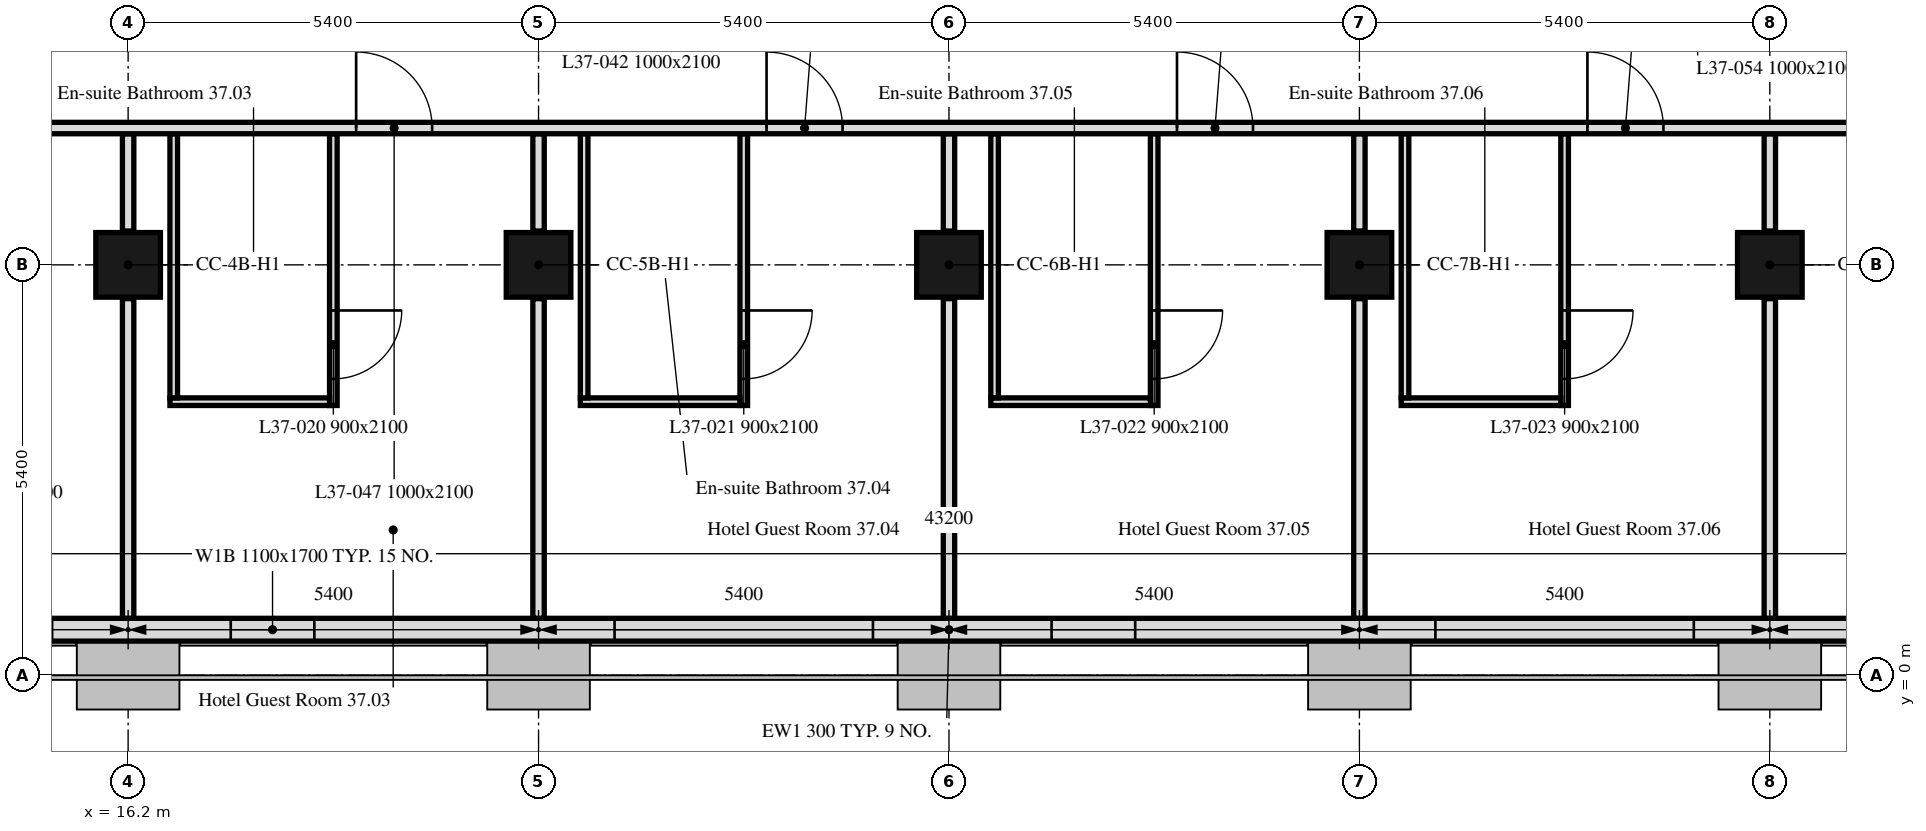
"""IFC4 building model, lengths in metres.
Left out: names, types, materials, properties, quantities, classifications, styles, units other than length and angle.
Written with IfcOpenShell. Run it as: python <this file> out.ifc"""

import sys

from ifc_helpers import new_model, si_unit, direction, frame, frame_2d, origin, origin_2d, place, context, subcontext, project, spatial, rectangle, extrude, element, fill, save


model = new_model("IFC4")
c1 = context("Model", 3, precision=1e-05, world=origin(), true_north=direction((0.0, 1.0)))
c2 = subcontext(c1, "Body", "Model", "MODEL_VIEW")
j1 = project(units=[si_unit("LENGTHUNIT", "METRE"), si_unit("PLANEANGLEUNIT", "RADIAN")], contexts=[c1])
p1 = place(None, origin())
s1 = spatial("IfcSite", under=j1, at=p1, CompositionType="ELEMENT")
p2 = place(p1, origin())
s2 = spatial("IfcBuilding", under=s1, at=p2, CompositionType="ELEMENT")
p3 = place(p2, frame((0.0, 0.0, 159.4)))
s3 = spatial("IfcBuildingStorey", under=s2, at=p3, CompositionType="ELEMENT", Elevation=159.4)
for number, where, z_axis, x_axis in (
    (1, (16.2, 5.4, 0.0), (0.0, 0.0, 1.0), (1.0, 0.0, 0.0)),
    (2, (21.6, 5.4, 0.0), (0.0, 0.0, 1.0), (1.0, 0.0, 0.0)),
    (3, (27.0, 5.4, 0.0), (0.0, 0.0, 1.0), (1.0, 0.0, 0.0)),
    (4, (32.4, 5.4, 0.0), (0.0, 0.0, 1.0), (1.0, 0.0, 0.0)),
    (5, (37.8, 5.4, 0.0), (0.0, 0.0, 1.0), (1.0, 0.0, 0.0)),
):
    element("IfcColumn", number, at=place(p3, frame(where, z_axis=z_axis, x_axis=x_axis)), inside=s3, PredefinedType="COLUMN", context=c2, shape_type="SweptSolid", body=[
        extrude(rectangle(XDim=0.85, YDim=0.85, at=origin_2d()), origin(), (0.0, 0.0, 1.0), 3.0),
    ])
p4 = place(p3, frame((10.986, 0.6, 0.0), z_axis=(0.0, 0.0, 1.0), x_axis=(1.0, 0.0, 0.0)))
e6 = element("IfcWall", 6, at=p4, inside=s3, PredefinedType="SOLIDWALL", context=c2, shape_type="SweptSolid", body=[
    extrude(rectangle(XDim=32.027, YDim=0.3, at=frame_2d((16.014, 0.0))), origin(), (0.0, 0.0, 1.0), 3.0),
])
p5 = place(p4, frame((0.814, 0.0, 0.9)))
e7 = element("IfcOpeningElement", 7, at=p5, cuts=e6, PredefinedType="OPENING", context=c2, shape_type="SweptSolid", body=[
    extrude(rectangle(XDim=3.4, YDim=1.7, at=frame_2d((1.7, 0.85))), frame((0.0, 0.16, 0.0), z_axis=(0.0, -1.0, 0.0), x_axis=(1.0, 0.0, 0.0)), (0.0, 0.0, 1.0), 0.32),
])
p6 = place(p4, frame((6.564, 0.0, 0.9)))
e8 = element("IfcOpeningElement", 8, at=p6, cuts=e6, PredefinedType="OPENING", context=c2, shape_type="SweptSolid", body=[
    extrude(rectangle(XDim=1.1, YDim=1.7, at=frame_2d((0.55, 0.85))), frame((0.0, 0.16, 0.0), z_axis=(0.0, -1.0, 0.0), x_axis=(1.0, 0.0, 0.0)), (0.0, 0.0, 1.0), 0.32),
])
p7 = place(p4, frame((11.614, 0.0, 0.9)))
e9 = element("IfcOpeningElement", 9, at=p7, cuts=e6, PredefinedType="OPENING", context=c2, shape_type="SweptSolid", body=[
    extrude(rectangle(XDim=3.4, YDim=1.7, at=frame_2d((1.7, 0.85))), frame((0.0, 0.16, 0.0), z_axis=(0.0, -1.0, 0.0), x_axis=(1.0, 0.0, 0.0)), (0.0, 0.0, 1.0), 0.32),
])
p8 = place(p4, frame((17.364, 0.0, 0.9)))
e10 = element("IfcOpeningElement", 10, at=p8, cuts=e6, PredefinedType="OPENING", context=c2, shape_type="SweptSolid", body=[
    extrude(rectangle(XDim=1.1, YDim=1.7, at=frame_2d((0.55, 0.85))), frame((0.0, 0.16, 0.0), z_axis=(0.0, -1.0, 0.0), x_axis=(1.0, 0.0, 0.0)), (0.0, 0.0, 1.0), 0.32),
])
p9 = place(p4, frame((22.414, 0.0, 0.9)))
e11 = element("IfcOpeningElement", 11, at=p9, cuts=e6, PredefinedType="OPENING", context=c2, shape_type="SweptSolid", body=[
    extrude(rectangle(XDim=3.4, YDim=1.7, at=frame_2d((1.7, 0.85))), frame((0.0, 0.16, 0.0), z_axis=(0.0, -1.0, 0.0), x_axis=(1.0, 0.0, 0.0)), (0.0, 0.0, 1.0), 0.32),
])
p10 = place(p4, frame((28.164, 0.0, 0.9)))
e12 = element("IfcOpeningElement", 12, at=p10, cuts=e6, PredefinedType="OPENING", context=c2, shape_type="SweptSolid", body=[
    extrude(rectangle(XDim=1.1, YDim=1.7, at=frame_2d((0.55, 0.85))), frame((0.0, 0.16, 0.0), z_axis=(0.0, -1.0, 0.0), x_axis=(1.0, 0.0, 0.0)), (0.0, 0.0, 1.0), 0.32),
])
p11 = place(p3, frame((16.2, 0.751, 0.0), z_axis=(0.0, 0.0, 1.0), x_axis=(0.0, 1.0, 0.0)))
e13 = element("IfcWall", 13, at=p11, inside=s3, PredefinedType="PARTITIONING", context=c2, shape_type="SweptSolid", body=[
    extrude(rectangle(XDim=4.204, YDim=0.15, at=frame_2d((2.102, 0.0))), origin(), (0.0, 0.0, 1.0), 2.4),
])
p12 = place(p3, frame((16.2, 5.845, 0.0), z_axis=(0.0, 0.0, 1.0), x_axis=(0.0, 1.0, 0.0)))
e14 = element("IfcWall", 14, at=p12, inside=s3, PredefinedType="PARTITIONING", context=c2, shape_type="SweptSolid", body=[
    extrude(rectangle(XDim=1.28, YDim=0.15, at=frame_2d((0.64, 0.0))), origin(), (0.0, 0.0, 1.0), 2.4),
])
p13 = place(p3, frame((21.6, 0.751, 0.0), z_axis=(0.0, 0.0, 1.0), x_axis=(0.0, 1.0, 0.0)))
e15 = element("IfcWall", 15, at=p13, inside=s3, PredefinedType="PARTITIONING", context=c2, shape_type="SweptSolid", body=[
    extrude(rectangle(XDim=4.204, YDim=0.15, at=frame_2d((2.102, 0.0))), origin(), (0.0, 0.0, 1.0), 2.4),
])
p14 = place(p3, frame((21.6, 5.845, 0.0), z_axis=(0.0, 0.0, 1.0), x_axis=(0.0, 1.0, 0.0)))
e16 = element("IfcWall", 16, at=p14, inside=s3, PredefinedType="PARTITIONING", context=c2, shape_type="SweptSolid", body=[
    extrude(rectangle(XDim=1.28, YDim=0.15, at=frame_2d((0.64, 0.0))), origin(), (0.0, 0.0, 1.0), 2.4),
])
p15 = place(p3, frame((18.9, 7.125, 0.0), z_axis=(0.0, 0.0, 1.0), x_axis=(0.0, -1.0, 0.0)))
e17 = element("IfcWall", 17, at=p15, inside=s3, PredefinedType="PARTITIONING", context=c2, shape_type="SweptSolid", body=[
    extrude(rectangle(XDim=3.575, YDim=0.1, at=frame_2d((1.788, 0.0))), origin(), (0.0, 0.0, 1.0), 3.0),
])
p16 = place(p15, frame((2.325, 0.0, 0.0)))
e18 = element("IfcOpeningElement", 18, at=p16, cuts=e17, PredefinedType="OPENING", context=c2, shape_type="SweptSolid", body=[
    extrude(rectangle(XDim=0.9, YDim=2.1, at=frame_2d((0.45, 1.05))), frame((0.0, 0.05, 0.0), z_axis=(0.0, -1.0, 0.0), x_axis=(1.0, 0.0, 0.0)), (0.0, 0.0, 1.0), 0.1),
])
p17 = place(p3, frame((18.85, 3.6, 0.0), z_axis=(0.0, 0.0, 1.0), x_axis=(-1.0, 0.0, 0.0)))
e19 = element("IfcWall", 19, at=p17, inside=s3, PredefinedType="PARTITIONING", context=c2, shape_type="SweptSolid", body=[
    extrude(rectangle(XDim=2.1, YDim=0.1, at=frame_2d((1.05, 0.0))), origin(), (0.0, 0.0, 1.0), 3.0),
])
p18 = place(p3, frame((16.8, 3.65, 0.0), z_axis=(0.0, 0.0, 1.0), x_axis=(0.0, 1.0, 0.0)))
e20 = element("IfcWall", 20, at=p18, inside=s3, PredefinedType="PARTITIONING", context=c2, shape_type="SweptSolid", body=[
    extrude(rectangle(XDim=3.475, YDim=0.1, at=frame_2d((1.738, 0.0))), origin(), (0.0, 0.0, 1.0), 3.0),
])
p19 = place(p3, frame((27.0, 0.751, 0.0), z_axis=(0.0, 0.0, 1.0), x_axis=(0.0, 1.0, 0.0)))
e21 = element("IfcWall", 21, at=p19, inside=s3, PredefinedType="PARTITIONING", context=c2, shape_type="SweptSolid", body=[
    extrude(rectangle(XDim=4.204, YDim=0.15, at=frame_2d((2.102, 0.0))), origin(), (0.0, 0.0, 1.0), 2.4),
])
p20 = place(p3, frame((27.0, 5.845, 0.0), z_axis=(0.0, 0.0, 1.0), x_axis=(0.0, 1.0, 0.0)))
e22 = element("IfcWall", 22, at=p20, inside=s3, PredefinedType="PARTITIONING", context=c2, shape_type="SweptSolid", body=[
    extrude(rectangle(XDim=1.28, YDim=0.15, at=frame_2d((0.64, 0.0))), origin(), (0.0, 0.0, 1.0), 2.4),
])
p21 = place(p3, frame((24.3, 7.125, 0.0), z_axis=(0.0, 0.0, 1.0), x_axis=(0.0, -1.0, 0.0)))
e23 = element("IfcWall", 23, at=p21, inside=s3, PredefinedType="PARTITIONING", context=c2, shape_type="SweptSolid", body=[
    extrude(rectangle(XDim=3.575, YDim=0.1, at=frame_2d((1.788, 0.0))), origin(), (0.0, 0.0, 1.0), 3.0),
])
p22 = place(p21, frame((2.325, 0.0, 0.0)))
e24 = element("IfcOpeningElement", 24, at=p22, cuts=e23, PredefinedType="OPENING", context=c2, shape_type="SweptSolid", body=[
    extrude(rectangle(XDim=0.9, YDim=2.1, at=frame_2d((0.45, 1.05))), frame((0.0, 0.05, 0.0), z_axis=(0.0, -1.0, 0.0), x_axis=(1.0, 0.0, 0.0)), (0.0, 0.0, 1.0), 0.1),
])
p23 = place(p3, frame((24.25, 3.6, 0.0), z_axis=(0.0, 0.0, 1.0), x_axis=(-1.0, 0.0, 0.0)))
e25 = element("IfcWall", 25, at=p23, inside=s3, PredefinedType="PARTITIONING", context=c2, shape_type="SweptSolid", body=[
    extrude(rectangle(XDim=2.1, YDim=0.1, at=frame_2d((1.05, 0.0))), origin(), (0.0, 0.0, 1.0), 3.0),
])
p24 = place(p3, frame((22.2, 3.65, 0.0), z_axis=(0.0, 0.0, 1.0), x_axis=(0.0, 1.0, 0.0)))
e26 = element("IfcWall", 26, at=p24, inside=s3, PredefinedType="PARTITIONING", context=c2, shape_type="SweptSolid", body=[
    extrude(rectangle(XDim=3.475, YDim=0.1, at=frame_2d((1.738, 0.0))), origin(), (0.0, 0.0, 1.0), 3.0),
])
p25 = place(p3, frame((32.4, 0.751, 0.0), z_axis=(0.0, 0.0, 1.0), x_axis=(0.0, 1.0, 0.0)))
e27 = element("IfcWall", 27, at=p25, inside=s3, PredefinedType="PARTITIONING", context=c2, shape_type="SweptSolid", body=[
    extrude(rectangle(XDim=4.204, YDim=0.15, at=frame_2d((2.102, 0.0))), origin(), (0.0, 0.0, 1.0), 2.4),
])
p26 = place(p3, frame((32.4, 5.845, 0.0), z_axis=(0.0, 0.0, 1.0), x_axis=(0.0, 1.0, 0.0)))
e28 = element("IfcWall", 28, at=p26, inside=s3, PredefinedType="PARTITIONING", context=c2, shape_type="SweptSolid", body=[
    extrude(rectangle(XDim=1.28, YDim=0.15, at=frame_2d((0.64, 0.0))), origin(), (0.0, 0.0, 1.0), 2.4),
])
p27 = place(p3, frame((29.7, 7.125, 0.0), z_axis=(0.0, 0.0, 1.0), x_axis=(0.0, -1.0, 0.0)))
e29 = element("IfcWall", 29, at=p27, inside=s3, PredefinedType="PARTITIONING", context=c2, shape_type="SweptSolid", body=[
    extrude(rectangle(XDim=3.575, YDim=0.1, at=frame_2d((1.788, 0.0))), origin(), (0.0, 0.0, 1.0), 3.0),
])
p28 = place(p27, frame((2.325, 0.0, 0.0)))
e30 = element("IfcOpeningElement", 30, at=p28, cuts=e29, PredefinedType="OPENING", context=c2, shape_type="SweptSolid", body=[
    extrude(rectangle(XDim=0.9, YDim=2.1, at=frame_2d((0.45, 1.05))), frame((0.0, 0.05, 0.0), z_axis=(0.0, -1.0, 0.0), x_axis=(1.0, 0.0, 0.0)), (0.0, 0.0, 1.0), 0.1),
])
p29 = place(p3, frame((29.65, 3.6, 0.0), z_axis=(0.0, 0.0, 1.0), x_axis=(-1.0, 0.0, 0.0)))
e31 = element("IfcWall", 31, at=p29, inside=s3, PredefinedType="PARTITIONING", context=c2, shape_type="SweptSolid", body=[
    extrude(rectangle(XDim=2.1, YDim=0.1, at=frame_2d((1.05, 0.0))), origin(), (0.0, 0.0, 1.0), 3.0),
])
p30 = place(p3, frame((27.6, 3.65, 0.0), z_axis=(0.0, 0.0, 1.0), x_axis=(0.0, 1.0, 0.0)))
e32 = element("IfcWall", 32, at=p30, inside=s3, PredefinedType="PARTITIONING", context=c2, shape_type="SweptSolid", body=[
    extrude(rectangle(XDim=3.475, YDim=0.1, at=frame_2d((1.738, 0.0))), origin(), (0.0, 0.0, 1.0), 3.0),
])
p31 = place(p3, frame((37.8, 0.751, 0.0), z_axis=(0.0, 0.0, 1.0), x_axis=(0.0, 1.0, 0.0)))
e33 = element("IfcWall", 33, at=p31, inside=s3, PredefinedType="PARTITIONING", context=c2, shape_type="SweptSolid", body=[
    extrude(rectangle(XDim=4.204, YDim=0.15, at=frame_2d((2.102, 0.0))), origin(), (0.0, 0.0, 1.0), 2.4),
])
p32 = place(p3, frame((37.8, 5.845, 0.0), z_axis=(0.0, 0.0, 1.0), x_axis=(0.0, 1.0, 0.0)))
e34 = element("IfcWall", 34, at=p32, inside=s3, PredefinedType="PARTITIONING", context=c2, shape_type="SweptSolid", body=[
    extrude(rectangle(XDim=1.28, YDim=0.15, at=frame_2d((0.64, 0.0))), origin(), (0.0, 0.0, 1.0), 2.4),
])
p33 = place(p3, frame((35.1, 7.125, 0.0), z_axis=(0.0, 0.0, 1.0), x_axis=(0.0, -1.0, 0.0)))
e35 = element("IfcWall", 35, at=p33, inside=s3, PredefinedType="PARTITIONING", context=c2, shape_type="SweptSolid", body=[
    extrude(rectangle(XDim=3.575, YDim=0.1, at=frame_2d((1.788, 0.0))), origin(), (0.0, 0.0, 1.0), 3.0),
])
p34 = place(p33, frame((2.325, 0.0, 0.0)))
e36 = element("IfcOpeningElement", 36, at=p34, cuts=e35, PredefinedType="OPENING", context=c2, shape_type="SweptSolid", body=[
    extrude(rectangle(XDim=0.9, YDim=2.1, at=frame_2d((0.45, 1.05))), frame((0.0, 0.05, 0.0), z_axis=(0.0, -1.0, 0.0), x_axis=(1.0, 0.0, 0.0)), (0.0, 0.0, 1.0), 0.1),
])
p35 = place(p3, frame((35.05, 3.6, 0.0), z_axis=(0.0, 0.0, 1.0), x_axis=(-1.0, 0.0, 0.0)))
e37 = element("IfcWall", 37, at=p35, inside=s3, PredefinedType="PARTITIONING", context=c2, shape_type="SweptSolid", body=[
    extrude(rectangle(XDim=2.1, YDim=0.1, at=frame_2d((1.05, 0.0))), origin(), (0.0, 0.0, 1.0), 3.0),
])
p36 = place(p3, frame((33.0, 3.65, 0.0), z_axis=(0.0, 0.0, 1.0), x_axis=(0.0, 1.0, 0.0)))
e38 = element("IfcWall", 38, at=p36, inside=s3, PredefinedType="PARTITIONING", context=c2, shape_type="SweptSolid", body=[
    extrude(rectangle(XDim=3.475, YDim=0.1, at=frame_2d((1.738, 0.0))), origin(), (0.0, 0.0, 1.0), 3.0),
])
p37 = place(p3, frame((6.151, 7.2, 0.0), z_axis=(0.0, 0.0, 1.0), x_axis=(1.0, 0.0, 0.0)))
e39 = element("IfcWall", 39, at=p37, inside=s3, PredefinedType="PARTITIONING", context=c2, shape_type="SweptSolid", body=[
    extrude(rectangle(XDim=41.698, YDim=0.15, at=frame_2d((20.849, 0.0))), origin(), (0.0, 0.0, 1.0), 2.4),
])
p38 = place(p37, frame((2.249, 0.0, 0.0)))
e40 = element("IfcOpeningElement", 40, at=p38, cuts=e39, PredefinedType="OPENING", context=c2, shape_type="SweptSolid", body=[
    extrude(rectangle(XDim=1.0, YDim=2.1, at=frame_2d((0.5, 1.05))), frame((0.0, 0.075, 0.0), z_axis=(0.0, -1.0, 0.0), x_axis=(1.0, 0.0, 0.0)), (0.0, 0.0, 1.0), 0.15),
])
p39 = place(p37, frame((7.649, 0.0, 0.0)))
e41 = element("IfcOpeningElement", 41, at=p39, cuts=e39, PredefinedType="OPENING", context=c2, shape_type="SweptSolid", body=[
    extrude(rectangle(XDim=1.0, YDim=2.1, at=frame_2d((0.5, 1.05))), frame((0.0, 0.075, 0.0), z_axis=(0.0, -1.0, 0.0), x_axis=(1.0, 0.0, 0.0)), (0.0, 0.0, 1.0), 0.15),
])
p40 = place(p37, frame((13.049, 0.0, 0.0)))
e42 = element("IfcOpeningElement", 42, at=p40, cuts=e39, PredefinedType="OPENING", context=c2, shape_type="SweptSolid", body=[
    extrude(rectangle(XDim=1.0, YDim=2.1, at=frame_2d((0.5, 1.05))), frame((0.0, 0.075, 0.0), z_axis=(0.0, -1.0, 0.0), x_axis=(1.0, 0.0, 0.0)), (0.0, 0.0, 1.0), 0.15),
])
p41 = place(p37, frame((18.449, 0.0, 0.0)))
e43 = element("IfcOpeningElement", 43, at=p41, cuts=e39, PredefinedType="OPENING", context=c2, shape_type="SweptSolid", body=[
    extrude(rectangle(XDim=1.0, YDim=2.1, at=frame_2d((0.5, 1.05))), frame((0.0, 0.075, 0.0), z_axis=(0.0, -1.0, 0.0), x_axis=(1.0, 0.0, 0.0)), (0.0, 0.0, 1.0), 0.15),
])
p42 = place(p37, frame((23.849, 0.0, 0.0)))
e44 = element("IfcOpeningElement", 44, at=p42, cuts=e39, PredefinedType="OPENING", context=c2, shape_type="SweptSolid", body=[
    extrude(rectangle(XDim=1.0, YDim=2.1, at=frame_2d((0.5, 1.05))), frame((0.0, 0.075, 0.0), z_axis=(0.0, -1.0, 0.0), x_axis=(1.0, 0.0, 0.0)), (0.0, 0.0, 1.0), 0.15),
])
p43 = place(p37, frame((29.249, 0.0, 0.0)))
e45 = element("IfcOpeningElement", 45, at=p43, cuts=e39, PredefinedType="OPENING", context=c2, shape_type="SweptSolid", body=[
    extrude(rectangle(XDim=1.0, YDim=2.1, at=frame_2d((0.5, 1.05))), frame((0.0, 0.075, 0.0), z_axis=(0.0, -1.0, 0.0), x_axis=(1.0, 0.0, 0.0)), (0.0, 0.0, 1.0), 0.15),
])
p44 = place(p37, frame((37.599, 0.0, 0.0)))
e46 = element("IfcOpeningElement", 46, at=p44, cuts=e39, PredefinedType="OPENING", context=c2, shape_type="SweptSolid", body=[
    extrude(rectangle(XDim=1.0, YDim=2.1, at=frame_2d((0.5, 1.05))), frame((0.0, 0.075, 0.0), z_axis=(0.0, -1.0, 0.0), x_axis=(1.0, 0.0, 0.0)), (0.0, 0.0, 1.0), 0.15),
])
p45 = place(p6, origin())
e47 = element("IfcWindow", 47, at=p45, inside=s3, PartitioningType="SINGLE_PANEL", PredefinedType="WINDOW", context=c2, shape_type="SweptSolid", body=[
    extrude(rectangle(XDim=1.1, YDim=1.7, at=frame_2d((0.55, 0.85))), frame((0.0, 0.03, 0.0), z_axis=(0.0, -1.0, 0.0), x_axis=(1.0, 0.0, 0.0)), (0.0, 0.0, 1.0), 0.06),
])
fill(e8, e47)
p46 = place(p7, origin())
e48 = element("IfcWindow", 48, at=p46, inside=s3, PartitioningType="SINGLE_PANEL", PredefinedType="WINDOW", context=c2, shape_type="SweptSolid", body=[
    extrude(rectangle(XDim=3.4, YDim=1.7, at=frame_2d((1.7, 0.85))), frame((0.0, 0.03, 0.0), z_axis=(0.0, -1.0, 0.0), x_axis=(1.0, 0.0, 0.0)), (0.0, 0.0, 1.0), 0.06),
])
fill(e9, e48)
p47 = place(p8, origin())
e49 = element("IfcWindow", 49, at=p47, inside=s3, PartitioningType="SINGLE_PANEL", PredefinedType="WINDOW", context=c2, shape_type="SweptSolid", body=[
    extrude(rectangle(XDim=1.1, YDim=1.7, at=frame_2d((0.55, 0.85))), frame((0.0, 0.03, 0.0), z_axis=(0.0, -1.0, 0.0), x_axis=(1.0, 0.0, 0.0)), (0.0, 0.0, 1.0), 0.06),
])
fill(e10, e49)
p48 = place(p9, origin())
e50 = element("IfcWindow", 50, at=p48, inside=s3, PartitioningType="SINGLE_PANEL", PredefinedType="WINDOW", context=c2, shape_type="SweptSolid", body=[
    extrude(rectangle(XDim=3.4, YDim=1.7, at=frame_2d((1.7, 0.85))), frame((0.0, 0.03, 0.0), z_axis=(0.0, -1.0, 0.0), x_axis=(1.0, 0.0, 0.0)), (0.0, 0.0, 1.0), 0.06),
])
fill(e11, e50)
p49 = place(p16, origin())
e51 = element("IfcDoor", 51, at=p49, inside=s3, OperationType="SINGLE_SWING_RIGHT", PredefinedType="DOOR", context=c2, shape_type="SweptSolid", body=[
    extrude(rectangle(XDim=0.9, YDim=2.1, at=frame_2d((0.45, 1.05))), frame((0.0, 0.025, 0.0), z_axis=(0.0, -1.0, 0.0), x_axis=(1.0, 0.0, 0.0)), (0.0, 0.0, 1.0), 0.05),
])
fill(e18, e51)
p50 = place(p22, origin())
e52 = element("IfcDoor", 52, at=p50, inside=s3, OperationType="SINGLE_SWING_RIGHT", PredefinedType="DOOR", context=c2, shape_type="SweptSolid", body=[
    extrude(rectangle(XDim=0.9, YDim=2.1, at=frame_2d((0.45, 1.05))), frame((0.0, 0.025, 0.0), z_axis=(0.0, -1.0, 0.0), x_axis=(1.0, 0.0, 0.0)), (0.0, 0.0, 1.0), 0.05),
])
fill(e24, e52)
p51 = place(p28, origin())
e53 = element("IfcDoor", 53, at=p51, inside=s3, OperationType="SINGLE_SWING_LEFT", PredefinedType="DOOR", context=c2, shape_type="SweptSolid", body=[
    extrude(rectangle(XDim=0.9, YDim=2.1, at=frame_2d((0.45, 1.05))), frame((0.0, 0.025, 0.0), z_axis=(0.0, -1.0, 0.0), x_axis=(1.0, 0.0, 0.0)), (0.0, 0.0, 1.0), 0.05),
])
fill(e30, e53)
p52 = place(p34, origin())
e54 = element("IfcDoor", 54, at=p52, inside=s3, OperationType="SINGLE_SWING_LEFT", PredefinedType="DOOR", context=c2, shape_type="SweptSolid", body=[
    extrude(rectangle(XDim=0.9, YDim=2.1, at=frame_2d((0.45, 1.05))), frame((0.0, 0.025, 0.0), z_axis=(0.0, -1.0, 0.0), x_axis=(1.0, 0.0, 0.0)), (0.0, 0.0, 1.0), 0.05),
])
fill(e36, e54)
p53 = place(p40, origin())
e55 = element("IfcDoor", 55, at=p53, inside=s3, OperationType="SINGLE_SWING_RIGHT", PredefinedType="DOOR", context=c2, shape_type="SweptSolid", body=[
    extrude(rectangle(XDim=1.0, YDim=2.1, at=frame_2d((0.5, 1.05))), frame((0.0, 0.025, 0.0), z_axis=(0.0, -1.0, 0.0), x_axis=(1.0, 0.0, 0.0)), (0.0, 0.0, 1.0), 0.05),
])
fill(e42, e55)
p54 = place(p41, origin())
e56 = element("IfcDoor", 56, at=p54, inside=s3, OperationType="SINGLE_SWING_LEFT", PredefinedType="DOOR", context=c2, shape_type="SweptSolid", body=[
    extrude(rectangle(XDim=1.0, YDim=2.1, at=frame_2d((0.5, 1.05))), frame((0.0, 0.025, 0.0), z_axis=(0.0, -1.0, 0.0), x_axis=(1.0, 0.0, 0.0)), (0.0, 0.0, 1.0), 0.05),
])
fill(e43, e56)
p55 = place(p42, origin())
e57 = element("IfcDoor", 57, at=p55, inside=s3, OperationType="SINGLE_SWING_LEFT", PredefinedType="DOOR", context=c2, shape_type="SweptSolid", body=[
    extrude(rectangle(XDim=1.0, YDim=2.1, at=frame_2d((0.5, 1.05))), frame((0.0, 0.025, 0.0), z_axis=(0.0, -1.0, 0.0), x_axis=(1.0, 0.0, 0.0)), (0.0, 0.0, 1.0), 0.05),
])
fill(e44, e57)
p56 = place(p43, origin())
e58 = element("IfcDoor", 58, at=p56, inside=s3, OperationType="SINGLE_SWING_RIGHT", PredefinedType="DOOR", context=c2, shape_type="SweptSolid", body=[
    extrude(rectangle(XDim=1.0, YDim=2.1, at=frame_2d((0.5, 1.05))), frame((0.0, 0.025, 0.0), z_axis=(0.0, -1.0, 0.0), x_axis=(1.0, 0.0, 0.0)), (0.0, 0.0, 1.0), 0.05),
])
fill(e45, e58)
save(model, sys.argv[1])
